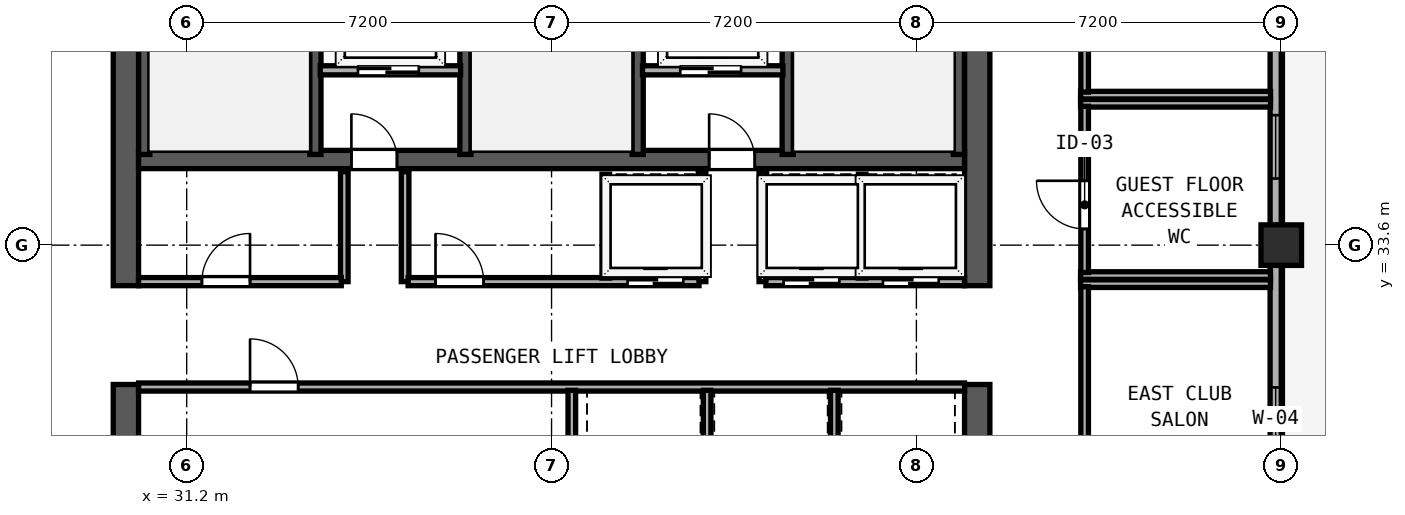
"""IFC4 building model, lengths in metres.
Left out: names, types, materials, properties, quantities, classifications, styles, units other than length and angle.
Written with IfcOpenShell. Run it as: python <this file> out.ifc"""

import sys

from ifc_helpers import new_model, si_unit, direction, frame, frame_2d, origin, origin_2d, place, context, subcontext, project, spatial, rectangle, hollow_rectangle, extrude, element, fill, save


model = new_model("IFC4")
c1 = context("Model", 3, precision=1e-05, world=origin(), true_north=direction((0.0, 1.0)))
c2 = subcontext(c1, "Body", "Model", "MODEL_VIEW")
j1 = project(units=[si_unit("LENGTHUNIT", "METRE"), si_unit("PLANEANGLEUNIT", "RADIAN")], contexts=[c1])
p1 = place(None, origin())
s1 = spatial("IfcSite", under=j1, at=p1, CompositionType="ELEMENT")
p2 = place(p1, origin())
s2 = spatial("IfcBuilding", under=s1, at=p2, CompositionType="ELEMENT")
p3 = place(p2, frame((0.0, 0.0, 235.2)))
s3 = spatial("IfcBuildingStorey", under=s2, at=p3, CompositionType="ELEMENT", Elevation=235.2)
p4 = place(p3, frame((30.0, 26.65, 0.0), z_axis=(0.0, 0.0, 1.0), x_axis=(0.0, 1.0, 0.0)))
e1 = element("IfcWall", 1, at=p4, inside=s3, PredefinedType="SHEAR", context=c2, shape_type="SweptSolid", body=[
    extrude(rectangle(XDim=4.2, YDim=0.5, at=frame_2d((2.1, 0.0))), origin(), (0.0, 0.0, 1.0), 3.67),
])
p5 = place(p3, frame((30.0, 32.8, 0.0), z_axis=(0.0, 0.0, 1.0), x_axis=(0.0, 1.0, 0.0)))
e2 = element("IfcWall", 2, at=p5, inside=s3, PredefinedType="SHEAR", context=c2, shape_type="SweptSolid", body=[
    extrude(rectangle(XDim=10.15, YDim=0.5, at=frame_2d((5.075, 0.0))), origin(), (0.0, 0.0, 1.0), 3.67),
])
p6 = place(p3, frame((46.8, 26.65, 0.0), z_axis=(0.0, 0.0, 1.0), x_axis=(0.0, 1.0, 0.0)))
e3 = element("IfcWall", 3, at=p6, inside=s3, PredefinedType="SHEAR", context=c2, shape_type="SweptSolid", body=[
    extrude(rectangle(XDim=4.2, YDim=0.5, at=frame_2d((2.1, 0.0))), origin(), (0.0, 0.0, 1.0), 3.67),
])
p7 = place(p3, frame((46.8, 32.8, 0.0), z_axis=(0.0, 0.0, 1.0), x_axis=(0.0, 1.0, 0.0)))
e4 = element("IfcWall", 4, at=p7, inside=s3, PredefinedType="SHEAR", context=c2, shape_type="SweptSolid", body=[
    extrude(rectangle(XDim=10.15, YDim=0.5, at=frame_2d((5.075, 0.0))), origin(), (0.0, 0.0, 1.0), 3.67),
])
p8 = place(p3, frame((30.25, 35.29, 0.0), z_axis=(0.0, 0.0, 1.0), x_axis=(1.0, 0.0, 0.0)))
e5 = element("IfcWall", 5, at=p8, inside=s3, PredefinedType="SHEAR", context=c2, shape_type="SweptSolid", body=[
    extrude(rectangle(XDim=16.3, YDim=0.36, at=frame_2d((8.15, 0.0))), origin(), (0.0, 0.0, 1.0), 3.67),
])
p9 = place(p8, frame((5.1, 0.0, 0.0), z_axis=(0.0, 0.0, 1.0), x_axis=(-1.0, 0.0, 0.0)))
e6 = element("IfcOpeningElement", 6, at=p9, cuts=e5, PredefinedType="OPENING", context=c2, shape_type="SweptSolid", body=[
    extrude(rectangle(XDim=0.9, YDim=2.1, at=frame_2d((0.45, 1.05))), frame((0.0, 0.19, 0.0), z_axis=(0.0, -1.0, 0.0), x_axis=(1.0, 0.0, 0.0)), (0.0, 0.0, 1.0), 0.38),
])
p10 = place(p8, frame((12.16, 0.0, 0.0), z_axis=(0.0, 0.0, 1.0), x_axis=(-1.0, 0.0, 0.0)))
e7 = element("IfcOpeningElement", 7, at=p10, cuts=e5, PredefinedType="OPENING", context=c2, shape_type="SweptSolid", body=[
    extrude(rectangle(XDim=0.9, YDim=2.1, at=frame_2d((0.45, 1.05))), frame((0.0, 0.19, 0.0), z_axis=(0.0, -1.0, 0.0), x_axis=(1.0, 0.0, 0.0)), (0.0, 0.0, 1.0), 0.38),
])
for number, where, z_axis, x_axis in (
    (8, (30.362, 35.39, 0.0), (0.0, 0.0, 1.0), (0.0, 1.0, 0.0)),
    (9, (33.74, 35.39, 0.0), (0.0, 0.0, 1.0), (0.0, 1.0, 0.0)),
    (10, (36.7, 35.39, 0.0), (0.0, 0.0, 1.0), (0.0, 1.0, 0.0)),
    (11, (40.1, 35.39, 0.0), (0.0, 0.0, 1.0), (0.0, 1.0, 0.0)),
    (12, (43.06, 35.39, 0.0), (0.0, 0.0, 1.0), (0.0, 1.0, 0.0)),
    (13, (46.438, 35.39, 0.0), (0.0, 0.0, 1.0), (0.0, 1.0, 0.0)),
):
    element("IfcWall", number, at=place(p3, frame(where, z_axis=z_axis, x_axis=x_axis)), inside=s3, PredefinedType="SHEAR", context=c2, shape_type="SweptSolid", body=[
        extrude(rectangle(XDim=7.56, YDim=0.22, at=frame_2d((3.78, 0.0))), origin(), (0.0, 0.0, 1.0), 3.67),
    ])
p11 = place(p3, frame((52.8, 33.6, 0.0), z_axis=(0.0, 0.0, 1.0), x_axis=(1.0, 0.0, 0.0)))
e14 = element("IfcColumn", 14, at=p11, inside=s3, PredefinedType="COLUMN", context=c2, shape_type="SweptSolid", body=[
    extrude(hollow_rectangle(XDim=0.8, YDim=0.8, WallThickness=0.03, at=origin_2d()), origin(), (0.0, 0.0, 1.0), 3.85),
])
p12 = place(p3, frame((52.69, 27.942, 0.0), z_axis=(0.0, 0.0, 1.0), x_axis=(0.0, 1.0, 0.0)))
e15 = element("IfcWall", 15, at=p12, inside=s3, PredefinedType="SOLIDWALL", context=c2, shape_type="SweptSolid", body=[
    extrude(rectangle(XDim=5.266, YDim=0.22, at=frame_2d((2.633, 0.0))), origin(), (0.0, 0.0, 1.0), 3.315),
])
p13 = place(p12, frame((1.6, 0.0, 0.85)))
e16 = element("IfcOpeningElement", 16, at=p13, cuts=e15, PredefinedType="OPENING", context=c2, shape_type="SweptSolid", body=[
    extrude(rectangle(XDim=1.25, YDim=1.95, at=frame_2d((0.625, 0.975))), frame((0.0, 0.12, 0.0), z_axis=(0.0, -1.0, 0.0), x_axis=(1.0, 0.0, 0.0)), (0.0, 0.0, 1.0), 0.24),
])
p14 = place(p3, frame((52.69, 33.992, 0.0), z_axis=(0.0, 0.0, 1.0), x_axis=(0.0, 1.0, 0.0)))
e17 = element("IfcWall", 17, at=p14, inside=s3, PredefinedType="SOLIDWALL", context=c2, shape_type="SweptSolid", body=[
    extrude(rectangle(XDim=5.266, YDim=0.22, at=frame_2d((2.633, 0.0))), origin(), (0.0, 0.0, 1.0), 3.315),
])
p15 = place(p14, frame((0.923, 0.0, 0.85)))
e18 = element("IfcOpeningElement", 18, at=p15, cuts=e17, PredefinedType="OPENING", context=c2, shape_type="SweptSolid", body=[
    extrude(rectangle(XDim=1.25, YDim=1.95, at=frame_2d((0.625, 0.975))), frame((0.0, 0.12, 0.0), z_axis=(0.0, -1.0, 0.0), x_axis=(1.0, 0.0, 0.0)), (0.0, 0.0, 1.0), 0.24),
])
p16 = place(p3, frame((33.835, 37.05, 0.0), z_axis=(0.0, 0.0, 1.0), x_axis=(1.0, 0.0, 0.0)))
e19 = element("IfcWall", 19, at=p16, inside=s3, PredefinedType="SOLIDWALL", context=c2, shape_type="SweptSolid", body=[
    extrude(rectangle(XDim=2.77, YDim=0.18, at=frame_2d((1.385, 0.0))), origin(), (0.0, 0.0, 1.0), 3.67),
])
p17 = place(p16, frame((1.945, 0.0, 0.0), z_axis=(0.0, 0.0, 1.0), x_axis=(-1.0, 0.0, 0.0)))
e20 = element("IfcOpeningElement", 20, at=p17, cuts=e19, PredefinedType="OPENING", context=c2, shape_type="SweptSolid", body=[
    extrude(rectangle(XDim=1.2, YDim=2.2, at=frame_2d((0.6, 1.1))), frame((0.0, 0.1, 0.0), z_axis=(0.0, -1.0, 0.0), x_axis=(1.0, 0.0, 0.0)), (0.0, 0.0, 1.0), 0.2),
])
for number, where, z_axis, x_axis in (
    (21, (34.31, 32.88, 0.0), (0.0, 0.0, 1.0), (0.0, 1.0, 0.0)),
    (22, (35.51, 32.88, 0.0), (0.0, 0.0, 1.0), (0.0, 1.0, 0.0)),
):
    element("IfcWall", number, at=place(p3, frame(where, z_axis=z_axis, x_axis=x_axis)), inside=s3, PredefinedType="SOLIDWALL", context=c2, shape_type="SweptSolid", body=[
        extrude(rectangle(XDim=2.17, YDim=0.15, at=frame_2d((1.085, 0.0))), origin(), (0.0, 0.0, 1.0), 3.67),
    ])
p18 = place(p3, frame((40.195, 37.05, 0.0), z_axis=(0.0, 0.0, 1.0), x_axis=(1.0, 0.0, 0.0)))
e23 = element("IfcWall", 23, at=p18, inside=s3, PredefinedType="SOLIDWALL", context=c2, shape_type="SweptSolid", body=[
    extrude(rectangle(XDim=2.77, YDim=0.18, at=frame_2d((1.385, 0.0))), origin(), (0.0, 0.0, 1.0), 3.67),
])
p19 = place(p18, frame((1.945, 0.0, 0.0), z_axis=(0.0, 0.0, 1.0), x_axis=(-1.0, 0.0, 0.0)))
e24 = element("IfcOpeningElement", 24, at=p19, cuts=e23, PredefinedType="OPENING", context=c2, shape_type="SweptSolid", body=[
    extrude(rectangle(XDim=1.2, YDim=2.2, at=frame_2d((0.6, 1.1))), frame((0.0, 0.1, 0.0), z_axis=(0.0, -1.0, 0.0), x_axis=(1.0, 0.0, 0.0)), (0.0, 0.0, 1.0), 0.2),
])
for number, where, z_axis, x_axis in (
    (25, (41.37, 32.88, 0.0), (0.0, 0.0, 1.0), (0.0, 1.0, 0.0)),
    (26, (42.57, 32.88, 0.0), (0.0, 0.0, 1.0), (0.0, 1.0, 0.0)),
):
    element("IfcWall", number, at=place(p3, frame(where, z_axis=z_axis, x_axis=x_axis)), inside=s3, PredefinedType="SOLIDWALL", context=c2, shape_type="SweptSolid", body=[
        extrude(rectangle(XDim=2.17, YDim=0.15, at=frame_2d((1.085, 0.0))), origin(), (0.0, 0.0, 1.0), 3.67),
    ])
p20 = place(p3, frame((30.25, 32.88, 0.0), z_axis=(0.0, 0.0, 1.0), x_axis=(1.0, 0.0, 0.0)))
e27 = element("IfcWall", 27, at=p20, inside=s3, PredefinedType="SOLIDWALL", context=c2, shape_type="SweptSolid", body=[
    extrude(rectangle(XDim=4.0, YDim=0.16, at=frame_2d((2.0, 0.0))), origin(), (0.0, 0.0, 1.0), 3.67),
])
p21 = place(p20, frame((2.2, 0.0, 0.0), z_axis=(0.0, 0.0, 1.0), x_axis=(-1.0, 0.0, 0.0)))
e28 = element("IfcOpeningElement", 28, at=p21, cuts=e27, PredefinedType="OPENING", context=c2, shape_type="SweptSolid", body=[
    extrude(rectangle(XDim=0.95, YDim=2.12, at=frame_2d((0.475, 1.06))), frame((0.0, 0.09, 0.0), z_axis=(0.0, -1.0, 0.0), x_axis=(1.0, 0.0, 0.0)), (0.0, 0.0, 1.0), 0.18),
])
p22 = place(p3, frame((35.57, 32.88, 0.0), z_axis=(0.0, 0.0, 1.0), x_axis=(1.0, 0.0, 0.0)))
e29 = element("IfcWall", 29, at=p22, inside=s3, PredefinedType="SOLIDWALL", context=c2, shape_type="SweptSolid", body=[
    extrude(rectangle(XDim=5.74, YDim=0.16, at=frame_2d((2.87, 0.0))), origin(), (0.0, 0.0, 1.0), 3.67),
])
p23 = place(p22, frame((1.49, 0.0, 0.0), z_axis=(0.0, 0.0, 1.0), x_axis=(-1.0, 0.0, 0.0)))
e30 = element("IfcOpeningElement", 30, at=p23, cuts=e29, PredefinedType="OPENING", context=c2, shape_type="SweptSolid", body=[
    extrude(rectangle(XDim=0.95, YDim=2.12, at=frame_2d((0.475, 1.06))), frame((0.0, 0.09, 0.0), z_axis=(0.0, -1.0, 0.0), x_axis=(1.0, 0.0, 0.0)), (0.0, 0.0, 1.0), 0.18),
])
p24 = place(p22, frame((5.43, 0.0, 0.0), z_axis=(0.0, 0.0, 1.0), x_axis=(-1.0, 0.0, 0.0)))
e31 = element("IfcOpeningElement", 31, at=p24, cuts=e29, PredefinedType="OPENING", context=c2, shape_type="SweptSolid", body=[
    extrude(rectangle(XDim=1.1, YDim=2.2, at=frame_2d((0.55, 1.1))), frame((0.0, 0.09, 0.0), z_axis=(0.0, -1.0, 0.0), x_axis=(1.0, 0.0, 0.0)), (0.0, 0.0, 1.0), 0.18),
])
p25 = place(p3, frame((42.63, 32.88, 0.0), z_axis=(0.0, 0.0, 1.0), x_axis=(1.0, 0.0, 0.0)))
e32 = element("IfcWall", 32, at=p25, inside=s3, PredefinedType="SOLIDWALL", context=c2, shape_type="SweptSolid", body=[
    extrude(rectangle(XDim=3.92, YDim=0.16, at=frame_2d((1.96, 0.0))), origin(), (0.0, 0.0, 1.0), 3.67),
])
p26 = place(p25, frame((1.45, 0.0, 0.0), z_axis=(0.0, 0.0, 1.0), x_axis=(-1.0, 0.0, 0.0)))
e33 = element("IfcOpeningElement", 33, at=p26, cuts=e32, PredefinedType="OPENING", context=c2, shape_type="SweptSolid", body=[
    extrude(rectangle(XDim=1.1, YDim=2.2, at=frame_2d((0.55, 1.1))), frame((0.0, 0.09, 0.0), z_axis=(0.0, -1.0, 0.0), x_axis=(1.0, 0.0, 0.0)), (0.0, 0.0, 1.0), 0.18),
])
p27 = place(p25, frame((3.41, 0.0, 0.0), z_axis=(0.0, 0.0, 1.0), x_axis=(-1.0, 0.0, 0.0)))
e34 = element("IfcOpeningElement", 34, at=p27, cuts=e32, PredefinedType="OPENING", context=c2, shape_type="SweptSolid", body=[
    extrude(rectangle(XDim=1.1, YDim=2.2, at=frame_2d((0.55, 1.1))), frame((0.0, 0.09, 0.0), z_axis=(0.0, -1.0, 0.0), x_axis=(1.0, 0.0, 0.0)), (0.0, 0.0, 1.0), 0.18),
])
for number, where, z_axis, x_axis in (
    (35, (39.47, 32.95, 0.0), (0.0, 0.0, 1.0), (0.0, 1.0, 0.0)),
    (36, (44.53, 32.95, 0.0), (0.0, 0.0, 1.0), (0.0, 1.0, 0.0)),
):
    element("IfcWall", number, at=place(p3, frame(where, z_axis=z_axis, x_axis=x_axis)), inside=s3, PredefinedType="SOLIDWALL", context=c2, shape_type="SweptSolid", body=[
        extrude(rectangle(XDim=2.05, YDim=0.15, at=frame_2d((1.025, 0.0))), origin(), (0.0, 0.0, 1.0), 3.67),
    ])
p28 = place(p3, frame((30.25, 30.8, 0.0), z_axis=(0.0, 0.0, 1.0), x_axis=(1.0, 0.0, 0.0)))
e37 = element("IfcWall", 37, at=p28, inside=s3, PredefinedType="SOLIDWALL", context=c2, shape_type="SweptSolid", body=[
    extrude(rectangle(XDim=16.3, YDim=0.16, at=frame_2d((8.15, 0.0))), origin(), (0.0, 0.0, 1.0), 3.67),
])
p29 = place(p28, frame((2.2, 0.0, 0.0)))
e38 = element("IfcOpeningElement", 38, at=p29, cuts=e37, PredefinedType="OPENING", context=c2, shape_type="SweptSolid", body=[
    extrude(rectangle(XDim=0.95, YDim=2.12, at=frame_2d((0.475, 1.06))), frame((0.0, 0.09, 0.0), z_axis=(0.0, -1.0, 0.0), x_axis=(1.0, 0.0, 0.0)), (0.0, 0.0, 1.0), 0.18),
])
p30 = place(p3, frame((38.8, 26.66, 0.0), z_axis=(0.0, 0.0, 1.0), x_axis=(0.0, 1.0, 0.0)))
e39 = element("IfcWall", 39, at=p30, inside=s3, PredefinedType="SOLIDWALL", context=c2, shape_type="SweptSolid", body=[
    extrude(rectangle(XDim=4.075, YDim=0.15, at=frame_2d((2.038, 0.0))), origin(), (0.0, 0.0, 1.0), 3.67),
])
for number, where, z_axis, x_axis in (
    (40, (41.47, 28.75, 0.0), (0.0, 0.0, 1.0), (0.0, 1.0, 0.0)),
    (41, (43.98, 28.75, 0.0), (0.0, 0.0, 1.0), (0.0, 1.0, 0.0)),
):
    element("IfcWall", number, at=place(p3, frame(where, z_axis=z_axis, x_axis=x_axis)), inside=s3, PredefinedType="SOLIDWALL", context=c2, shape_type="SweptSolid", body=[
        extrude(rectangle(XDim=1.985, YDim=0.15, at=frame_2d((0.993, 0.0))), origin(), (0.0, 0.0, 1.0), 3.67),
    ])
for number, where, z_axis, x_axis in (
    (42, (48.84, 36.4, 0.0), (0.0, 0.0, 1.0), (1.0, 0.0, 0.0)),
    (43, (48.84, 33.0, 0.0), (0.0, 0.0, 1.0), (1.0, 0.0, 0.0)),
):
    element("IfcWall", number, at=place(p3, frame(where, z_axis=z_axis, x_axis=x_axis)), inside=s3, PredefinedType="PARTITIONING", context=c2, shape_type="SweptSolid", body=[
        extrude(rectangle(XDim=3.748, YDim=0.15, at=frame_2d((1.874, 0.0))), origin(), (0.0, 0.0, 1.0), 3.67),
    ])
p31 = place(p3, frame((48.92, 33.06, 0.0), z_axis=(0.0, 0.0, 1.0), x_axis=(0.0, 1.0, 0.0)))
e44 = element("IfcWall", 44, at=p31, inside=s3, PredefinedType="PARTITIONING", context=c2, shape_type="SweptSolid", body=[
    extrude(rectangle(XDim=3.28, YDim=0.15, at=frame_2d((1.64, 0.0))), origin(), (0.0, 0.0, 1.0), 3.67),
])
p32 = place(p31, frame((0.86, 0.0, 0.0)))
e45 = element("IfcOpeningElement", 45, at=p32, cuts=e44, PredefinedType="OPENING", context=c2, shape_type="SweptSolid", body=[
    extrude(rectangle(XDim=0.95, YDim=2.12, at=frame_2d((0.475, 1.06))), frame((0.0, 0.085, 0.0), z_axis=(0.0, -1.0, 0.0), x_axis=(1.0, 0.0, 0.0)), (0.0, 0.0, 1.0), 0.17),
])
p33 = place(p3, frame((48.84, 36.56, 0.0), z_axis=(0.0, 0.0, 1.0), x_axis=(1.0, 0.0, 0.0)))
e46 = element("IfcWall", 46, at=p33, inside=s3, PredefinedType="PARTITIONING", context=c2, shape_type="SweptSolid", body=[
    extrude(rectangle(XDim=3.748, YDim=0.15, at=frame_2d((1.874, 0.0))), origin(), (0.0, 0.0, 1.0), 3.67),
])
p34 = place(p3, frame((48.92, 36.62, 0.0), z_axis=(0.0, 0.0, 1.0), x_axis=(0.0, 1.0, 0.0)))
e47 = element("IfcWall", 47, at=p34, inside=s3, PredefinedType="PARTITIONING", context=c2, shape_type="SweptSolid", body=[
    extrude(rectangle(XDim=9.34, YDim=0.15, at=frame_2d((4.67, 0.0))), origin(), (0.0, 0.0, 1.0), 3.67),
])
p35 = place(p34, frame((3.06, 0.0, 0.0)))
e48 = element("IfcOpeningElement", 48, at=p35, cuts=e47, PredefinedType="OPENING", context=c2, shape_type="SweptSolid", body=[
    extrude(rectangle(XDim=0.95, YDim=2.12, at=frame_2d((0.475, 1.06))), frame((0.0, 0.085, 0.0), z_axis=(0.0, -1.0, 0.0), x_axis=(1.0, 0.0, 0.0)), (0.0, 0.0, 1.0), 0.17),
])
p36 = place(p3, frame((48.84, 32.84, 0.0), z_axis=(0.0, 0.0, 1.0), x_axis=(1.0, 0.0, 0.0)))
e49 = element("IfcWall", 49, at=p36, inside=s3, PredefinedType="PARTITIONING", context=c2, shape_type="SweptSolid", body=[
    extrude(rectangle(XDim=3.748, YDim=0.15, at=frame_2d((1.874, 0.0))), origin(), (0.0, 0.0, 1.0), 3.67),
])
p37 = place(p3, frame((48.92, 26.41, 0.0), z_axis=(0.0, 0.0, 1.0), x_axis=(0.0, 1.0, 0.0)))
e50 = element("IfcWall", 50, at=p37, inside=s3, PredefinedType="PARTITIONING", context=c2, shape_type="SweptSolid", body=[
    extrude(rectangle(XDim=6.37, YDim=0.15, at=frame_2d((3.185, 0.0))), origin(), (0.0, 0.0, 1.0), 3.67),
])
p38 = place(p37, frame((0.86, 0.0, 0.0)))
e51 = element("IfcOpeningElement", 51, at=p38, cuts=e50, PredefinedType="OPENING", context=c2, shape_type="SweptSolid", body=[
    extrude(rectangle(XDim=0.95, YDim=2.12, at=frame_2d((0.475, 1.06))), frame((0.0, 0.085, 0.0), z_axis=(0.0, -1.0, 0.0), x_axis=(1.0, 0.0, 0.0)), (0.0, 0.0, 1.0), 0.17),
])
p39 = place(p13, origin())
e52 = element("IfcWindow", 52, at=p39, inside=s3, PartitioningType="SINGLE_PANEL", PredefinedType="WINDOW", context=c2, shape_type="SweptSolid", body=[
    extrude(rectangle(XDim=1.25, YDim=1.95, at=frame_2d((0.625, 0.975))), frame((0.0, 0.03, 0.0), z_axis=(0.0, -1.0, 0.0), x_axis=(1.0, 0.0, 0.0)), (0.0, 0.0, 1.0), 0.06),
])
fill(e16, e52)
p40 = place(p15, origin())
e53 = element("IfcWindow", 53, at=p40, inside=s3, PartitioningType="SINGLE_PANEL", PredefinedType="WINDOW", context=c2, shape_type="SweptSolid", body=[
    extrude(rectangle(XDim=1.25, YDim=1.95, at=frame_2d((0.625, 0.975))), frame((0.0, 0.03, 0.0), z_axis=(0.0, -1.0, 0.0), x_axis=(1.0, 0.0, 0.0)), (0.0, 0.0, 1.0), 0.06),
])
fill(e18, e53)
p41 = place(p17, origin())
e54 = element("IfcDoor", 54, at=p41, inside=s3, OperationType="SLIDING_TO_RIGHT", PredefinedType="DOOR", context=c2, shape_type="SweptSolid", body=[
    extrude(rectangle(XDim=1.2, YDim=2.2, at=frame_2d((0.6, 1.1))), frame((0.0, 0.025, 0.0), z_axis=(0.0, -1.0, 0.0), x_axis=(1.0, 0.0, 0.0)), (0.0, 0.0, 1.0), 0.05),
])
fill(e20, e54)
p42 = place(p9, origin())
e55 = element("IfcDoor", 55, at=p42, inside=s3, OperationType="SINGLE_SWING_RIGHT", PredefinedType="DOOR", context=c2, shape_type="SweptSolid", body=[
    extrude(rectangle(XDim=0.9, YDim=2.1, at=frame_2d((0.45, 1.05))), frame((0.0, 0.025, 0.0), z_axis=(0.0, -1.0, 0.0), x_axis=(1.0, 0.0, 0.0)), (0.0, 0.0, 1.0), 0.05),
])
fill(e6, e55)
p43 = place(p19, origin())
e56 = element("IfcDoor", 56, at=p43, inside=s3, OperationType="SLIDING_TO_RIGHT", PredefinedType="DOOR", context=c2, shape_type="SweptSolid", body=[
    extrude(rectangle(XDim=1.2, YDim=2.2, at=frame_2d((0.6, 1.1))), frame((0.0, 0.025, 0.0), z_axis=(0.0, -1.0, 0.0), x_axis=(1.0, 0.0, 0.0)), (0.0, 0.0, 1.0), 0.05),
])
fill(e24, e56)
p44 = place(p10, origin())
e57 = element("IfcDoor", 57, at=p44, inside=s3, OperationType="SINGLE_SWING_RIGHT", PredefinedType="DOOR", context=c2, shape_type="SweptSolid", body=[
    extrude(rectangle(XDim=0.9, YDim=2.1, at=frame_2d((0.45, 1.05))), frame((0.0, 0.025, 0.0), z_axis=(0.0, -1.0, 0.0), x_axis=(1.0, 0.0, 0.0)), (0.0, 0.0, 1.0), 0.05),
])
fill(e7, e57)
p45 = place(p21, origin())
e58 = element("IfcDoor", 58, at=p45, inside=s3, OperationType="SINGLE_SWING_LEFT", PredefinedType="DOOR", context=c2, shape_type="SweptSolid", body=[
    extrude(rectangle(XDim=0.95, YDim=2.12, at=frame_2d((0.475, 1.06))), frame((0.0, 0.025, 0.0), z_axis=(0.0, -1.0, 0.0), x_axis=(1.0, 0.0, 0.0)), (0.0, 0.0, 1.0), 0.05),
])
fill(e28, e58)
p46 = place(p23, origin())
e59 = element("IfcDoor", 59, at=p46, inside=s3, OperationType="SINGLE_SWING_RIGHT", PredefinedType="DOOR", context=c2, shape_type="SweptSolid", body=[
    extrude(rectangle(XDim=0.95, YDim=2.12, at=frame_2d((0.475, 1.06))), frame((0.0, 0.025, 0.0), z_axis=(0.0, -1.0, 0.0), x_axis=(1.0, 0.0, 0.0)), (0.0, 0.0, 1.0), 0.05),
])
fill(e30, e59)
p47 = place(p24, origin())
e60 = element("IfcDoor", 60, at=p47, inside=s3, OperationType="SLIDING_TO_RIGHT", PredefinedType="DOOR", context=c2, shape_type="SweptSolid", body=[
    extrude(rectangle(XDim=1.1, YDim=2.2, at=frame_2d((0.55, 1.1))), frame((0.0, 0.025, 0.0), z_axis=(0.0, -1.0, 0.0), x_axis=(1.0, 0.0, 0.0)), (0.0, 0.0, 1.0), 0.05),
])
fill(e31, e60)
p48 = place(p26, origin())
e61 = element("IfcDoor", 61, at=p48, inside=s3, OperationType="SLIDING_TO_RIGHT", PredefinedType="DOOR", context=c2, shape_type="SweptSolid", body=[
    extrude(rectangle(XDim=1.1, YDim=2.2, at=frame_2d((0.55, 1.1))), frame((0.0, 0.025, 0.0), z_axis=(0.0, -1.0, 0.0), x_axis=(1.0, 0.0, 0.0)), (0.0, 0.0, 1.0), 0.05),
])
fill(e33, e61)
p49 = place(p27, origin())
e62 = element("IfcDoor", 62, at=p49, inside=s3, OperationType="SLIDING_TO_RIGHT", PredefinedType="DOOR", context=c2, shape_type="SweptSolid", body=[
    extrude(rectangle(XDim=1.1, YDim=2.2, at=frame_2d((0.55, 1.1))), frame((0.0, 0.025, 0.0), z_axis=(0.0, -1.0, 0.0), x_axis=(1.0, 0.0, 0.0)), (0.0, 0.0, 1.0), 0.05),
])
fill(e34, e62)
p50 = place(p29, origin())
e63 = element("IfcDoor", 63, at=p50, inside=s3, OperationType="SINGLE_SWING_LEFT", PredefinedType="DOOR", context=c2, shape_type="SweptSolid", body=[
    extrude(rectangle(XDim=0.95, YDim=2.12, at=frame_2d((0.475, 1.06))), frame((0.0, 0.025, 0.0), z_axis=(0.0, -1.0, 0.0), x_axis=(1.0, 0.0, 0.0)), (0.0, 0.0, 1.0), 0.05),
])
fill(e38, e63)
p51 = place(p32, origin())
e64 = element("IfcDoor", 64, at=p51, inside=s3, OperationType="SINGLE_SWING_RIGHT", PredefinedType="DOOR", context=c2, shape_type="SweptSolid", body=[
    extrude(rectangle(XDim=0.95, YDim=2.12, at=frame_2d((0.475, 1.06))), frame((0.0, 0.025, 0.0), z_axis=(0.0, -1.0, 0.0), x_axis=(1.0, 0.0, 0.0)), (0.0, 0.0, 1.0), 0.05),
])
fill(e45, e64)
save(model, sys.argv[1])
